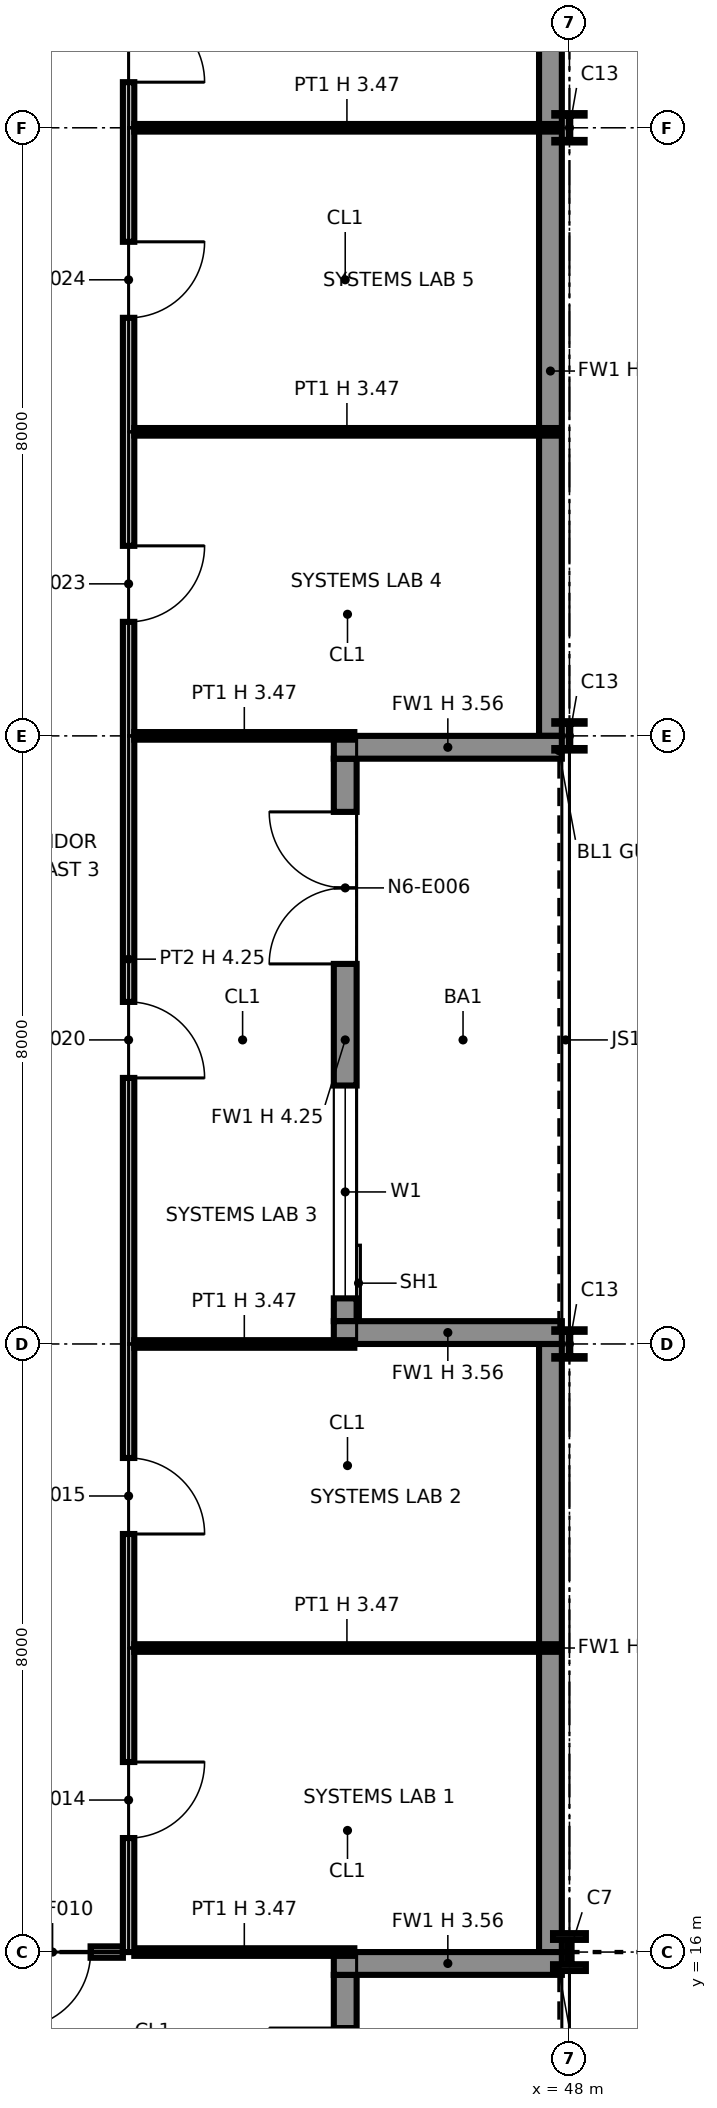
"""IFC4 building model, lengths in metres.
Left out: names, types, materials, properties, quantities, classifications, styles, units other than length and angle.
Written with IfcOpenShell. Run it as: python <this file> out.ifc"""

import sys

from ifc_helpers import new_model, si_unit, direction, frame, frame_2d, origin, origin_2d, place, context, subcontext, project, spatial, polyline, rectangle, i_section, outline, extrude, element, fill, save


model = new_model("IFC4")
c1 = context("Model", 3, precision=1e-05, world=origin(), true_north=direction((0.0, 1.0)))
c2 = subcontext(c1, "Body", "Model", "MODEL_VIEW")
j1 = project(units=[si_unit("LENGTHUNIT", "METRE"), si_unit("PLANEANGLEUNIT", "RADIAN")], contexts=[c1])
p1 = place(None, origin())
s1 = spatial("IfcSite", under=j1, at=p1, CompositionType="ELEMENT")
p2 = place(p1, origin())
s2 = spatial("IfcBuilding", under=s1, at=p2, CompositionType="ELEMENT")
p3 = place(p2, frame((0.0, 0.0, 96.4)))
s3 = spatial("IfcBuildingStorey", under=s2, at=p3, CompositionType="ELEMENT", Elevation=96.4)
p4 = place(p3, frame((48.0, 16.0, 0.0), z_axis=(0.0, 0.0, 1.0), x_axis=(1.0, 0.0, 0.0)))
e1 = element("IfcColumn", 1, at=p4, inside=s3, PredefinedType="COLUMN", context=c2, shape_type="SweptSolid", body=[
    extrude(i_section(OverallWidth=0.432, OverallDepth=0.498, WebThickness=0.056, FlangeThickness=0.089, at=origin_2d()), origin(), (0.0, 0.0, 1.0), 4.25),
])
for number, where, z_axis, x_axis in (
    (2, (48.0, 24.0, 0.0), (0.0, 0.0, 1.0), (1.0, 0.0, 0.0)),
    (3, (48.0, 32.0, 0.0), (0.0, 0.0, 1.0), (1.0, 0.0, 0.0)),
    (4, (48.0, 40.0, 0.0), (0.0, 0.0, 1.0), (1.0, 0.0, 0.0)),
):
    element("IfcColumn", number, at=place(p3, frame(where, z_axis=z_axis, x_axis=x_axis)), inside=s3, PredefinedType="COLUMN", context=c2, shape_type="SweptSolid", body=[
        extrude(i_section(OverallWidth=0.399, OverallDepth=0.386, WebThickness=0.021, FlangeThickness=0.033, at=origin_2d()), origin(), (0.0, 0.0, 1.0), 4.25),
    ])
p5 = place(p3, frame((45.05, 8.3, 0.0), z_axis=(0.0, 0.0, 1.0), x_axis=(0.0, 1.0, 0.0)))
e5 = element("IfcWall", 5, at=p5, inside=s3, PredefinedType="SOLIDWALL", context=c2, shape_type="SweptSolid", body=[
    extrude(rectangle(XDim=7.4, YDim=0.3, at=frame_2d((3.7, 0.0))), origin(), (0.0, 0.0, 1.0), 4.25),
])
p6 = place(p5, frame((0.3, 0.0, 0.9)))
e6 = element("IfcOpeningElement", 6, at=p6, cuts=e5, PredefinedType="OPENING", context=c2, shape_type="SweptSolid", body=[
    extrude(rectangle(XDim=2.8, YDim=2.2, at=frame_2d((1.4, 1.1))), frame((0.0, 0.16, 0.0), z_axis=(0.0, -1.0, 0.0), x_axis=(1.0, 0.0, 0.0)), (0.0, 0.0, 1.0), 0.32),
])
p7 = place(p5, frame((4.7, 0.0, 0.0)))
e7 = element("IfcOpeningElement", 7, at=p7, cuts=e5, PredefinedType="OPENING", context=c2, shape_type="SweptSolid", body=[
    extrude(rectangle(XDim=2.0, YDim=2.4, at=frame_2d((1.0, 1.2))), frame((0.0, 0.16, 0.0), z_axis=(0.0, -1.0, 0.0), x_axis=(1.0, 0.0, 0.0)), (0.0, 0.0, 1.0), 0.32),
])
p8 = place(p3, frame((47.9, 15.85, 0.0), z_axis=(0.0, 0.0, 1.0), x_axis=(-1.0, 0.0, 0.0)))
e8 = element("IfcWall", 8, at=p8, inside=s3, PredefinedType="SOLIDWALL", context=c2, shape_type="SweptSolid", body=[
    extrude(rectangle(XDim=3.0, YDim=0.3, at=frame_2d((1.5, 0.0))), origin(), (0.0, 0.0, 1.0), 3.556),
])
p9 = place(p3, frame((47.75, 16.0, 0.0), z_axis=(0.0, 0.0, 1.0), x_axis=(0.0, 1.0, 0.0)))
e9 = element("IfcWall", 9, at=p9, inside=s3, PredefinedType="SOLIDWALL", context=c2, shape_type="SweptSolid", body=[
    extrude(rectangle(XDim=8.0, YDim=0.3, at=frame_2d((4.0, 0.0))), origin(), (0.0, 0.0, 1.0), 4.25),
])
p10 = place(p3, frame((45.05, 24.3, 0.0), z_axis=(0.0, 0.0, 1.0), x_axis=(0.0, 1.0, 0.0)))
e10 = element("IfcWall", 10, at=p10, inside=s3, PredefinedType="SOLIDWALL", context=c2, shape_type="SweptSolid", body=[
    extrude(rectangle(XDim=7.4, YDim=0.3, at=frame_2d((3.7, 0.0))), origin(), (0.0, 0.0, 1.0), 4.25),
])
p11 = place(p10, frame((0.3, 0.0, 0.9)))
e11 = element("IfcOpeningElement", 11, at=p11, cuts=e10, PredefinedType="OPENING", context=c2, shape_type="SweptSolid", body=[
    extrude(rectangle(XDim=2.8, YDim=2.2, at=frame_2d((1.4, 1.1))), frame((0.0, 0.16, 0.0), z_axis=(0.0, -1.0, 0.0), x_axis=(1.0, 0.0, 0.0)), (0.0, 0.0, 1.0), 0.32),
])
p12 = place(p10, frame((4.7, 0.0, 0.0)))
e12 = element("IfcOpeningElement", 12, at=p12, cuts=e10, PredefinedType="OPENING", context=c2, shape_type="SweptSolid", body=[
    extrude(rectangle(XDim=2.0, YDim=2.4, at=frame_2d((1.0, 1.2))), frame((0.0, 0.16, 0.0), z_axis=(0.0, -1.0, 0.0), x_axis=(1.0, 0.0, 0.0)), (0.0, 0.0, 1.0), 0.32),
])
for number, where, z_axis, x_axis in (
    (13, (47.9, 24.15, 0.0), (0.0, 0.0, 1.0), (-1.0, 0.0, 0.0)),
    (14, (47.9, 31.85, 0.0), (0.0, 0.0, 1.0), (-1.0, 0.0, 0.0)),
):
    element("IfcWall", number, at=place(p3, frame(where, z_axis=z_axis, x_axis=x_axis)), inside=s3, PredefinedType="SOLIDWALL", context=c2, shape_type="SweptSolid", body=[
        extrude(rectangle(XDim=3.0, YDim=0.3, at=frame_2d((1.5, 0.0))), origin(), (0.0, 0.0, 1.0), 3.556),
    ])
p13 = place(p3, frame((47.75, 32.0, 0.0), z_axis=(0.0, 0.0, 1.0), x_axis=(0.0, 1.0, 0.0)))
e15 = element("IfcWall", 15, at=p13, inside=s3, PredefinedType="SOLIDWALL", context=c2, shape_type="SweptSolid", body=[
    extrude(rectangle(XDim=9.6, YDim=0.3, at=frame_2d((4.8, 0.0))), origin(), (0.0, 0.0, 1.0), 4.25),
])
p14 = place(p3, frame((40.03, 16.0, 0.0), z_axis=(0.0, 0.0, 1.0), x_axis=(1.0, 0.0, 0.0)))
e16 = element("IfcWall", 16, at=p14, inside=s3, PredefinedType="PARTITIONING", context=c2, shape_type="SweptSolid", body=[
    extrude(rectangle(XDim=2.095, YDim=0.15, at=frame_2d((1.047, 0.0))), origin(), (0.0, 0.0, 1.0), 3.47),
])
p15 = place(p14, frame((1.67, 0.0, 0.0), z_axis=(0.0, 0.0, 1.0), x_axis=(-1.0, 0.0, 0.0)))
e17 = element("IfcOpeningElement", 17, at=p15, cuts=e16, PredefinedType="OPENING", context=c2, shape_type="SweptSolid", body=[
    extrude(rectangle(XDim=1.0, YDim=2.1, at=frame_2d((0.5, 1.05))), frame((0.0, 0.085, 0.0), z_axis=(0.0, -1.0, 0.0), x_axis=(1.0, 0.0, 0.0)), (0.0, 0.0, 1.0), 0.17),
])
p16 = place(p3, frame((42.275, 16.0, 0.0), z_axis=(0.0, 0.0, 1.0), x_axis=(1.0, 0.0, 0.0)))
e18 = element("IfcWall", 18, at=p16, inside=s3, PredefinedType="PARTITIONING", context=c2, shape_type="SweptSolid", body=[
    extrude(rectangle(XDim=2.895, YDim=0.1, at=frame_2d((1.448, 0.0))), origin(), (0.0, 0.0, 1.0), 3.47),
])
p17 = place(p3, frame((42.2, 16.0, 0.0), z_axis=(0.0, 0.0, 1.0), x_axis=(0.0, 1.0, 0.0)))
e19 = element("IfcWall", 19, at=p17, inside=s3, PredefinedType="PARTITIONING", context=c2, shape_type="SweptSolid", body=[
    extrude(outline(polyline([(0.0, 0.0), (26.125, 0.0), (26.125, 4.25), (24.3, 4.25), (24.298, 3.47), (23.702, 3.47), (23.7, 4.25), (20.3, 4.25), (20.298, 3.47), (19.702, 3.47), (19.7, 4.25), (16.3, 4.25), (16.298, 3.47), (15.702, 3.47), (15.7, 4.25), (12.3, 4.25), (12.298, 3.47), (11.702, 3.47), (11.7, 4.25), (8.3, 4.25), (8.298, 3.47), (7.702, 3.47), (7.7, 4.25), (4.3, 4.25), (4.298, 3.47), (3.702, 3.47), (3.7, 4.25), (0.0, 4.25), (0.0, 0.0)])), frame((0.0, 0.075, 0.0), z_axis=(0.0, -1.0, 0.0), x_axis=(1.0, 0.0, 0.0)), (0.0, 0.0, 1.0), 0.15),
])
p18 = place(p17, frame((2.5, 0.0, 0.0), z_axis=(0.0, 0.0, 1.0), x_axis=(-1.0, 0.0, 0.0)))
e20 = element("IfcOpeningElement", 20, at=p18, cuts=e19, PredefinedType="OPENING", context=c2, shape_type="SweptSolid", body=[
    extrude(rectangle(XDim=1.0, YDim=2.1, at=frame_2d((0.5, 1.05))), frame((0.0, 0.085, 0.0), z_axis=(0.0, -1.0, 0.0), x_axis=(1.0, 0.0, 0.0)), (0.0, 0.0, 1.0), 0.17),
])
p19 = place(p17, frame((6.5, 0.0, 0.0), z_axis=(0.0, 0.0, 1.0), x_axis=(-1.0, 0.0, 0.0)))
e21 = element("IfcOpeningElement", 21, at=p19, cuts=e19, PredefinedType="OPENING", context=c2, shape_type="SweptSolid", body=[
    extrude(rectangle(XDim=1.0, YDim=2.1, at=frame_2d((0.5, 1.05))), frame((0.0, 0.085, 0.0), z_axis=(0.0, -1.0, 0.0), x_axis=(1.0, 0.0, 0.0)), (0.0, 0.0, 1.0), 0.17),
])
p20 = place(p17, frame((12.5, 0.0, 0.0), z_axis=(0.0, 0.0, 1.0), x_axis=(-1.0, 0.0, 0.0)))
e22 = element("IfcOpeningElement", 22, at=p20, cuts=e19, PredefinedType="OPENING", context=c2, shape_type="SweptSolid", body=[
    extrude(rectangle(XDim=1.0, YDim=2.1, at=frame_2d((0.5, 1.05))), frame((0.0, 0.085, 0.0), z_axis=(0.0, -1.0, 0.0), x_axis=(1.0, 0.0, 0.0)), (0.0, 0.0, 1.0), 0.17),
])
p21 = place(p17, frame((18.5, 0.0, 0.0), z_axis=(0.0, 0.0, 1.0), x_axis=(-1.0, 0.0, 0.0)))
e23 = element("IfcOpeningElement", 23, at=p21, cuts=e19, PredefinedType="OPENING", context=c2, shape_type="SweptSolid", body=[
    extrude(rectangle(XDim=1.0, YDim=2.1, at=frame_2d((0.5, 1.05))), frame((0.0, 0.085, 0.0), z_axis=(0.0, -1.0, 0.0), x_axis=(1.0, 0.0, 0.0)), (0.0, 0.0, 1.0), 0.17),
])
p22 = place(p17, frame((22.5, 0.0, 0.0), z_axis=(0.0, 0.0, 1.0), x_axis=(-1.0, 0.0, 0.0)))
e24 = element("IfcOpeningElement", 24, at=p22, cuts=e19, PredefinedType="OPENING", context=c2, shape_type="SweptSolid", body=[
    extrude(rectangle(XDim=1.0, YDim=2.1, at=frame_2d((0.5, 1.05))), frame((0.0, 0.085, 0.0), z_axis=(0.0, -1.0, 0.0), x_axis=(1.0, 0.0, 0.0)), (0.0, 0.0, 1.0), 0.17),
])
p23 = place(p17, frame((25.6, 0.0, 0.0), z_axis=(0.0, 0.0, 1.0), x_axis=(-1.0, 0.0, 0.0)))
e25 = element("IfcOpeningElement", 25, at=p23, cuts=e19, PredefinedType="OPENING", context=c2, shape_type="SweptSolid", body=[
    extrude(rectangle(XDim=1.0, YDim=2.1, at=frame_2d((0.5, 1.05))), frame((0.0, 0.085, 0.0), z_axis=(0.0, -1.0, 0.0), x_axis=(1.0, 0.0, 0.0)), (0.0, 0.0, 1.0), 0.17),
])
p24 = place(p3, frame((42.275, 20.0, 0.0), z_axis=(0.0, 0.0, 1.0), x_axis=(1.0, 0.0, 0.0)))
e26 = element("IfcWall", 26, at=p24, inside=s3, PredefinedType="PARTITIONING", context=c2, shape_type="SweptSolid", body=[
    extrude(rectangle(XDim=5.595, YDim=0.1, at=frame_2d((2.798, 0.0))), origin(), (0.0, 0.0, 1.0), 3.47),
])
for number, where, z_axis, x_axis in (
    (27, (42.275, 24.0, 0.0), (0.0, 0.0, 1.0), (1.0, 0.0, 0.0)),
    (28, (42.275, 32.0, 0.0), (0.0, 0.0, 1.0), (1.0, 0.0, 0.0)),
):
    element("IfcWall", number, at=place(p3, frame(where, z_axis=z_axis, x_axis=x_axis)), inside=s3, PredefinedType="PARTITIONING", context=c2, shape_type="SweptSolid", body=[
        extrude(rectangle(XDim=2.895, YDim=0.1, at=frame_2d((1.448, 0.0))), origin(), (0.0, 0.0, 1.0), 3.47),
    ])
for number, where, z_axis, x_axis in (
    (29, (42.275, 36.0, 0.0), (0.0, 0.0, 1.0), (1.0, 0.0, 0.0)),
    (30, (42.275, 40.0, 0.0), (0.0, 0.0, 1.0), (1.0, 0.0, 0.0)),
):
    element("IfcWall", number, at=place(p3, frame(where, z_axis=z_axis, x_axis=x_axis)), inside=s3, PredefinedType="PARTITIONING", context=c2, shape_type="SweptSolid", body=[
        extrude(rectangle(XDim=5.595, YDim=0.1, at=frame_2d((2.798, 0.0))), origin(), (0.0, 0.0, 1.0), 3.47),
    ])
p25 = place(p11, origin())
e31 = element("IfcWindow", 31, at=p25, inside=s3, PartitioningType="SINGLE_PANEL", PredefinedType="WINDOW", context=c2, shape_type="SweptSolid", body=[
    extrude(rectangle(XDim=2.8, YDim=2.2, at=frame_2d((1.4, 1.1))), frame((0.0, 0.03, 0.0), z_axis=(0.0, -1.0, 0.0), x_axis=(1.0, 0.0, 0.0)), (0.0, 0.0, 1.0), 0.06),
])
fill(e11, e31)
p26 = place(p12, origin())
e32 = element("IfcDoor", 32, at=p26, inside=s3, OperationType="DOUBLE_DOOR_SINGLE_SWING", PredefinedType="DOOR", context=c2, shape_type="SweptSolid", body=[
    extrude(rectangle(XDim=2.0, YDim=2.4, at=frame_2d((1.0, 1.2))), frame((0.0, 0.025, 0.0), z_axis=(0.0, -1.0, 0.0), x_axis=(1.0, 0.0, 0.0)), (0.0, 0.0, 1.0), 0.05),
])
fill(e12, e32)
p27 = place(p15, origin())
e33 = element("IfcDoor", 33, at=p27, inside=s3, OperationType="SINGLE_SWING_RIGHT", PredefinedType="DOOR", context=c2, shape_type="SweptSolid", body=[
    extrude(rectangle(XDim=1.0, YDim=2.1, at=frame_2d((0.5, 1.05))), frame((0.0, 0.025, 0.0), z_axis=(0.0, -1.0, 0.0), x_axis=(1.0, 0.0, 0.0)), (0.0, 0.0, 1.0), 0.05),
])
fill(e17, e33)
p28 = place(p18, origin())
e34 = element("IfcDoor", 34, at=p28, inside=s3, OperationType="SINGLE_SWING_LEFT", PredefinedType="DOOR", context=c2, shape_type="SweptSolid", body=[
    extrude(rectangle(XDim=1.0, YDim=2.1, at=frame_2d((0.5, 1.05))), frame((0.0, 0.025, 0.0), z_axis=(0.0, -1.0, 0.0), x_axis=(1.0, 0.0, 0.0)), (0.0, 0.0, 1.0), 0.05),
])
fill(e20, e34)
p29 = place(p19, origin())
e35 = element("IfcDoor", 35, at=p29, inside=s3, OperationType="SINGLE_SWING_RIGHT", PredefinedType="DOOR", context=c2, shape_type="SweptSolid", body=[
    extrude(rectangle(XDim=1.0, YDim=2.1, at=frame_2d((0.5, 1.05))), frame((0.0, 0.025, 0.0), z_axis=(0.0, -1.0, 0.0), x_axis=(1.0, 0.0, 0.0)), (0.0, 0.0, 1.0), 0.05),
])
fill(e21, e35)
p30 = place(p20, origin())
e36 = element("IfcDoor", 36, at=p30, inside=s3, OperationType="SINGLE_SWING_RIGHT", PredefinedType="DOOR", context=c2, shape_type="SweptSolid", body=[
    extrude(rectangle(XDim=1.0, YDim=2.1, at=frame_2d((0.5, 1.05))), frame((0.0, 0.025, 0.0), z_axis=(0.0, -1.0, 0.0), x_axis=(1.0, 0.0, 0.0)), (0.0, 0.0, 1.0), 0.05),
])
fill(e22, e36)
p31 = place(p21, origin())
e37 = element("IfcDoor", 37, at=p31, inside=s3, OperationType="SINGLE_SWING_LEFT", PredefinedType="DOOR", context=c2, shape_type="SweptSolid", body=[
    extrude(rectangle(XDim=1.0, YDim=2.1, at=frame_2d((0.5, 1.05))), frame((0.0, 0.025, 0.0), z_axis=(0.0, -1.0, 0.0), x_axis=(1.0, 0.0, 0.0)), (0.0, 0.0, 1.0), 0.05),
])
fill(e23, e37)
p32 = place(p22, origin())
e38 = element("IfcDoor", 38, at=p32, inside=s3, OperationType="SINGLE_SWING_LEFT", PredefinedType="DOOR", context=c2, shape_type="SweptSolid", body=[
    extrude(rectangle(XDim=1.0, YDim=2.1, at=frame_2d((0.5, 1.05))), frame((0.0, 0.025, 0.0), z_axis=(0.0, -1.0, 0.0), x_axis=(1.0, 0.0, 0.0)), (0.0, 0.0, 1.0), 0.05),
])
fill(e24, e38)
p33 = place(p23, origin())
e39 = element("IfcDoor", 39, at=p33, inside=s3, OperationType="SINGLE_SWING_RIGHT", PredefinedType="DOOR", context=c2, shape_type="SweptSolid", body=[
    extrude(rectangle(XDim=1.0, YDim=2.1, at=frame_2d((0.5, 1.05))), frame((0.0, 0.025, 0.0), z_axis=(0.0, -1.0, 0.0), x_axis=(1.0, 0.0, 0.0)), (0.0, 0.0, 1.0), 0.05),
])
fill(e25, e39)
save(model, sys.argv[1])
